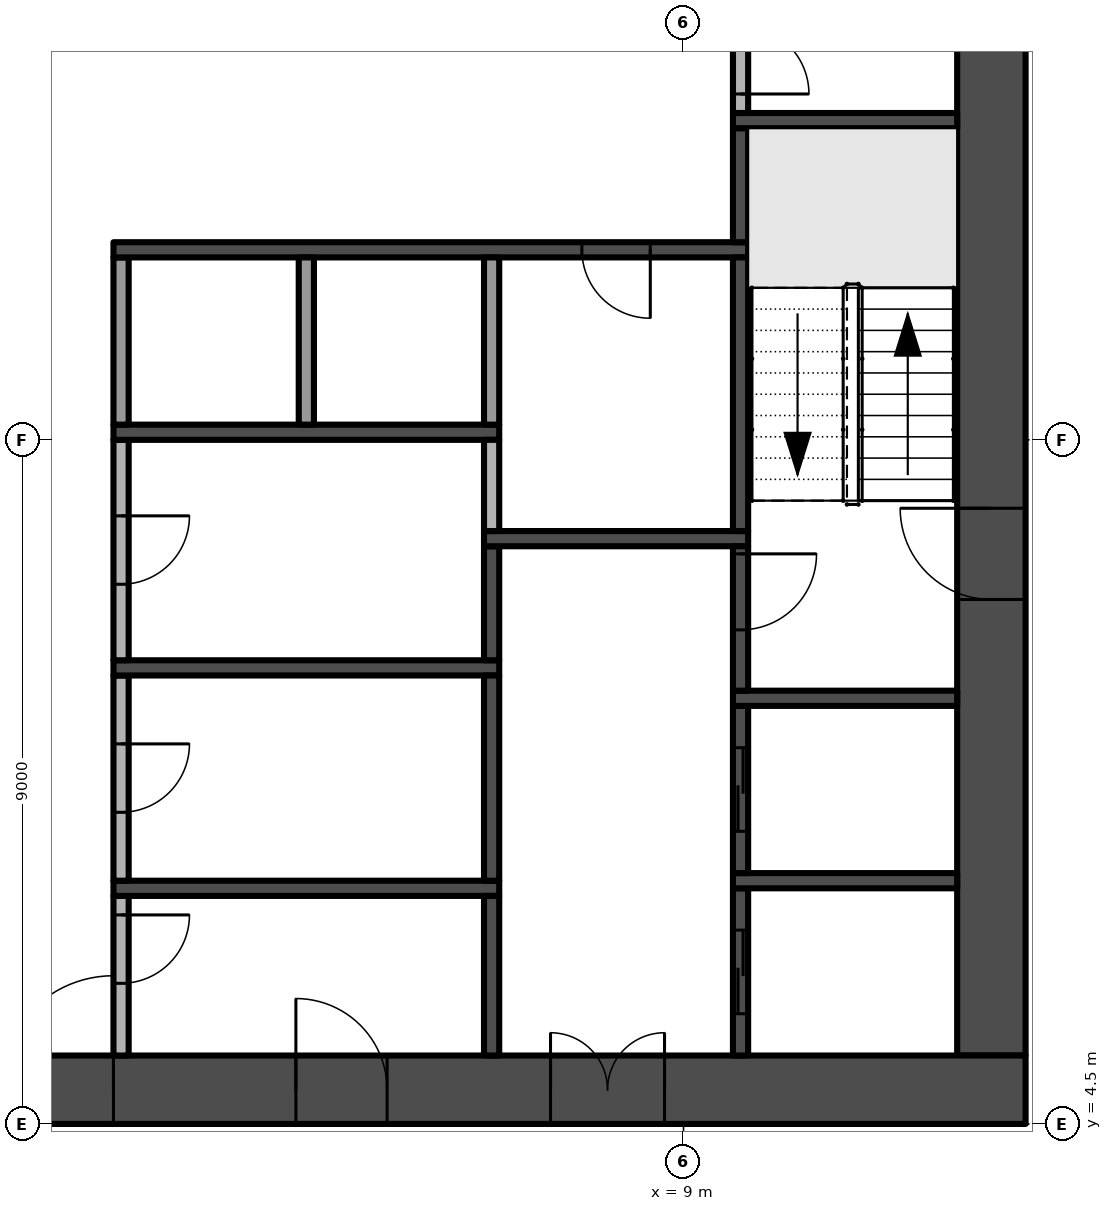
"""IFC4 building model, lengths in metres.
Left out: names, types, materials, properties, quantities, classifications, styles, units other than length and angle.
Written with IfcOpenShell. Run it as: python <this file> out.ifc"""

import sys

from ifc_helpers import new_model, si_unit, direction, frame, frame_2d, origin, place, context, subcontext, project, spatial, rectangle, extrude, element, fill, save


model = new_model("IFC4")
c1 = context("Model", 3, precision=1e-05, world=origin(), true_north=direction((0.0, 1.0)))
c2 = subcontext(c1, "Body", "Model", "MODEL_VIEW")
j1 = project(units=[si_unit("LENGTHUNIT", "METRE"), si_unit("PLANEANGLEUNIT", "RADIAN")], contexts=[c1])
p1 = place(None, origin())
s1 = spatial("IfcSite", under=j1, at=p1, CompositionType="ELEMENT")
p2 = place(p1, origin())
s2 = spatial("IfcBuilding", under=s1, at=p2, CompositionType="ELEMENT")
p3 = place(p2, frame((0.0, 0.0, 49.2)))
s3 = spatial("IfcBuildingStorey", under=s2, at=p3, CompositionType="ELEMENT", Elevation=49.2)
p4 = place(p3, frame((-13.5, 4.95, -0.3), z_axis=(0.0, 0.0, 1.0), x_axis=(1.0, 0.0, 0.0)))
e1 = element("IfcWall", 1, at=p4, inside=s3, PredefinedType="SHEAR", context=c2, shape_type="SweptSolid", body=[
    extrude(rectangle(XDim=27.0, YDim=0.9, at=frame_2d((13.5, 0.0))), origin(), (0.0, 0.0, 1.0), 3.8),
])
p5 = place(p4, frame((12.0, 0.0, 0.3)))
e2 = element("IfcOpeningElement", 2, at=p5, cuts=e1, PredefinedType="OPENING", context=c2, shape_type="SweptSolid", body=[
    extrude(rectangle(XDim=3.0, YDim=2.4, at=frame_2d((1.5, 1.2))), frame((0.0, 0.46, 0.0), z_axis=(0.0, -1.0, 0.0), x_axis=(1.0, 0.0, 0.0)), (0.0, 0.0, 1.0), 0.92),
])
p6 = place(p4, frame((4.9, 0.0, 0.3)))
e3 = element("IfcOpeningElement", 3, at=p6, cuts=e1, PredefinedType="OPENING", context=c2, shape_type="SweptSolid", body=[
    extrude(rectangle(XDim=1.2, YDim=2.2, at=frame_2d((0.6, 1.1))), frame((0.0, 0.46, 0.0), z_axis=(0.0, -1.0, 0.0), x_axis=(1.0, 0.0, 0.0)), (0.0, 0.0, 1.0), 0.92),
])
p7 = place(p4, frame((20.75, 0.0, 0.3)))
e4 = element("IfcOpeningElement", 4, at=p7, cuts=e1, PredefinedType="OPENING", context=c2, shape_type="SweptSolid", body=[
    extrude(rectangle(XDim=1.5, YDim=2.2, at=frame_2d((0.75, 1.1))), frame((0.0, 0.46, 0.0), z_axis=(0.0, -1.0, 0.0), x_axis=(1.0, 0.0, 0.0)), (0.0, 0.0, 1.0), 0.92),
])
p8 = place(p4, frame((17.4, 0.0, 0.3)))
e5 = element("IfcOpeningElement", 5, at=p8, cuts=e1, PredefinedType="OPENING", context=c2, shape_type="SweptSolid", body=[
    extrude(rectangle(XDim=1.2, YDim=2.2, at=frame_2d((0.6, 1.1))), frame((0.0, 0.46, 0.0), z_axis=(0.0, -1.0, 0.0), x_axis=(1.0, 0.0, 0.0)), (0.0, 0.0, 1.0), 0.92),
])
p9 = place(p3, frame((13.05, 5.4, -0.3), z_axis=(0.0, 0.0, 1.0), x_axis=(0.0, 1.0, 0.0)))
e6 = element("IfcWall", 6, at=p9, inside=s3, PredefinedType="SHEAR", context=c2, shape_type="SweptSolid", body=[
    extrude(rectangle(XDim=16.2, YDim=0.9, at=frame_2d((8.1, 0.0))), origin(), (0.0, 0.0, 1.0), 3.8),
])
p10 = place(p9, frame((6.0, 0.0, 0.3)))
e7 = element("IfcOpeningElement", 7, at=p10, cuts=e6, PredefinedType="OPENING", context=c2, shape_type="SweptSolid", body=[
    extrude(rectangle(XDim=1.2, YDim=2.2, at=frame_2d((0.6, 1.1))), frame((0.0, 0.46, 0.0), z_axis=(0.0, -1.0, 0.0), x_axis=(1.0, 0.0, 0.0)), (0.0, 0.0, 1.0), 0.92),
])
p11 = place(p3, frame((1.6, 7.5, 0.0), z_axis=(0.0, 0.0, 1.0), x_axis=(0.0, -1.0, 0.0)))
e8 = element("IfcWall", 8, at=p11, inside=s3, PredefinedType="PARTITIONING", context=c2, shape_type="SweptSolid", body=[
    extrude(rectangle(XDim=2.1, YDim=0.2, at=frame_2d((1.05, 0.0))), origin(), (0.0, 0.0, 1.0), 3.5),
])
p12 = place(p11, frame((0.25, 0.0, 0.0)))
e9 = element("IfcOpeningElement", 9, at=p12, cuts=e8, PredefinedType="OPENING", context=c2, shape_type="SweptSolid", body=[
    extrude(rectangle(XDim=0.9, YDim=2.1, at=frame_2d((0.45, 1.05))), frame((0.0, 0.11, 0.0), z_axis=(0.0, -1.0, 0.0), x_axis=(1.0, 0.0, 0.0)), (0.0, 0.0, 1.0), 0.22),
])
p13 = place(p3, frame((1.5, 7.6, 0.0), z_axis=(0.0, 0.0, 1.0), x_axis=(1.0, 0.0, 0.0)))
e10 = element("IfcWall", 10, at=p13, inside=s3, PredefinedType="SHEAR", context=c2, shape_type="SweptSolid", body=[
    extrude(rectangle(XDim=5.075, YDim=0.2, at=frame_2d((2.538, 0.0))), origin(), (0.0, 0.0, 1.0), 3.5),
])
p14 = place(p3, frame((1.6, 10.4, 0.0), z_axis=(0.0, 0.0, 1.0), x_axis=(0.0, -1.0, 0.0)))
e11 = element("IfcWall", 11, at=p14, inside=s3, PredefinedType="PARTITIONING", context=c2, shape_type="SweptSolid", body=[
    extrude(rectangle(XDim=2.7, YDim=0.2, at=frame_2d((1.35, 0.0))), origin(), (0.0, 0.0, 1.0), 3.5),
])
p15 = place(p14, frame((0.9, 0.0, 0.0)))
e12 = element("IfcOpeningElement", 12, at=p15, cuts=e11, PredefinedType="OPENING", context=c2, shape_type="SweptSolid", body=[
    extrude(rectangle(XDim=0.9, YDim=2.1, at=frame_2d((0.45, 1.05))), frame((0.0, 0.11, 0.0), z_axis=(0.0, -1.0, 0.0), x_axis=(1.0, 0.0, 0.0)), (0.0, 0.0, 1.0), 0.22),
])
p16 = place(p3, frame((1.5, 10.5, 0.0), z_axis=(0.0, 0.0, 1.0), x_axis=(1.0, 0.0, 0.0)))
e13 = element("IfcWall", 13, at=p16, inside=s3, PredefinedType="SHEAR", context=c2, shape_type="SweptSolid", body=[
    extrude(rectangle(XDim=5.075, YDim=0.2, at=frame_2d((2.538, 0.0))), origin(), (0.0, 0.0, 1.0), 3.5),
])
p17 = place(p3, frame((1.6, 13.5, 0.0), z_axis=(0.0, 0.0, 1.0), x_axis=(0.0, -1.0, 0.0)))
e14 = element("IfcWall", 14, at=p17, inside=s3, PredefinedType="PARTITIONING", context=c2, shape_type="SweptSolid", body=[
    extrude(rectangle(XDim=2.9, YDim=0.2, at=frame_2d((1.45, 0.0))), origin(), (0.0, 0.0, 1.0), 3.5),
])
p18 = place(p17, frame((1.0, 0.0, 0.0)))
e15 = element("IfcOpeningElement", 15, at=p18, cuts=e14, PredefinedType="OPENING", context=c2, shape_type="SweptSolid", body=[
    extrude(rectangle(XDim=0.9, YDim=2.1, at=frame_2d((0.45, 1.05))), frame((0.0, 0.11, 0.0), z_axis=(0.0, -1.0, 0.0), x_axis=(1.0, 0.0, 0.0)), (0.0, 0.0, 1.0), 0.22),
])
p19 = place(p3, frame((1.5, 13.6, 0.0), z_axis=(0.0, 0.0, 1.0), x_axis=(1.0, 0.0, 0.0)))
e16 = element("IfcWall", 16, at=p19, inside=s3, PredefinedType="SHEAR", context=c2, shape_type="SweptSolid", body=[
    extrude(rectangle(XDim=5.075, YDim=0.2, at=frame_2d((2.538, 0.0))), origin(), (0.0, 0.0, 1.0), 3.5),
])
p20 = place(p3, frame((1.6, 13.7, 0.0), z_axis=(0.0, 0.0, 1.0), x_axis=(0.0, 1.0, 0.0)))
e17 = element("IfcWall", 17, at=p20, inside=s3, PredefinedType="PARTITIONING", context=c2, shape_type="SweptSolid", body=[
    extrude(rectangle(XDim=2.2, YDim=0.2, at=frame_2d((1.1, 0.0))), origin(), (0.0, 0.0, 1.0), 3.5),
])
p21 = place(p3, frame((9.85, 16.0, 0.0), z_axis=(0.0, 0.0, 1.0), x_axis=(-1.0, 0.0, 0.0)))
e18 = element("IfcWall", 18, at=p21, inside=s3, PredefinedType="SHEAR", context=c2, shape_type="SweptSolid", body=[
    extrude(rectangle(XDim=8.35, YDim=0.2, at=frame_2d((4.175, 0.0))), origin(), (0.0, 0.0, 1.0), 3.5),
])
p22 = place(p21, frame((1.288, 0.0, 0.0)))
e19 = element("IfcOpeningElement", 19, at=p22, cuts=e18, PredefinedType="OPENING", context=c2, shape_type="SweptSolid", body=[
    extrude(rectangle(XDim=0.9, YDim=2.1, at=frame_2d((0.45, 1.05))), frame((0.0, 0.11, 0.0), z_axis=(0.0, -1.0, 0.0), x_axis=(1.0, 0.0, 0.0)), (0.0, 0.0, 1.0), 0.22),
])
p23 = place(p3, frame((4.037, 13.7, 0.0), z_axis=(0.0, 0.0, 1.0), x_axis=(0.0, 1.0, 0.0)))
e20 = element("IfcWall", 20, at=p23, inside=s3, PredefinedType="PARTITIONING", context=c2, shape_type="SweptSolid", body=[
    extrude(rectangle(XDim=2.2, YDim=0.2, at=frame_2d((1.1, 0.0))), origin(), (0.0, 0.0, 1.0), 3.5),
])
p24 = place(p3, frame((6.475, 5.4, 0.0), z_axis=(0.0, 0.0, 1.0), x_axis=(0.0, 1.0, 0.0)))
e21 = element("IfcWall", 21, at=p24, inside=s3, PredefinedType="SHEAR", context=c2, shape_type="SweptSolid", body=[
    extrude(rectangle(XDim=2.1, YDim=0.2, at=frame_2d((1.05, 0.0))), origin(), (0.0, 0.0, 1.0), 3.5),
])
p25 = place(p3, frame((6.475, 7.7, 0.0), z_axis=(0.0, 0.0, 1.0), x_axis=(0.0, 1.0, 0.0)))
e22 = element("IfcWall", 22, at=p25, inside=s3, PredefinedType="SHEAR", context=c2, shape_type="SweptSolid", body=[
    extrude(rectangle(XDim=2.7, YDim=0.2, at=frame_2d((1.35, 0.0))), origin(), (0.0, 0.0, 1.0), 3.5),
])
p26 = place(p3, frame((6.475, 10.6, 0.0), z_axis=(0.0, 0.0, 1.0), x_axis=(0.0, 1.0, 0.0)))
e23 = element("IfcWall", 23, at=p26, inside=s3, PredefinedType="SHEAR", context=c2, shape_type="SweptSolid", body=[
    extrude(rectangle(XDim=1.5, YDim=0.2, at=frame_2d((0.75, 0.0))), origin(), (0.0, 0.0, 1.0), 3.5),
])
p27 = place(p3, frame((6.375, 12.2, 0.0), z_axis=(0.0, 0.0, 1.0), x_axis=(1.0, 0.0, 0.0)))
e24 = element("IfcWall", 24, at=p27, inside=s3, PredefinedType="SHEAR", context=c2, shape_type="SweptSolid", body=[
    extrude(rectangle(XDim=3.475, YDim=0.2, at=frame_2d((1.738, 0.0))), origin(), (0.0, 0.0, 1.0), 3.5),
])
p28 = place(p3, frame((6.475, 12.3, 0.0), z_axis=(0.0, 0.0, 1.0), x_axis=(0.0, 1.0, 0.0)))
e25 = element("IfcWall", 25, at=p28, inside=s3, PredefinedType="PARTITIONING", context=c2, shape_type="SweptSolid", body=[
    extrude(rectangle(XDim=1.2, YDim=0.2, at=frame_2d((0.6, 0.0))), origin(), (0.0, 0.0, 1.0), 3.5),
])
p29 = place(p3, frame((6.475, 13.7, 0.0), z_axis=(0.0, 0.0, 1.0), x_axis=(0.0, 1.0, 0.0)))
e26 = element("IfcWall", 26, at=p29, inside=s3, PredefinedType="PARTITIONING", context=c2, shape_type="SweptSolid", body=[
    extrude(rectangle(XDim=2.2, YDim=0.2, at=frame_2d((1.1, 0.0))), origin(), (0.0, 0.0, 1.0), 3.5),
])
p30 = place(p3, frame((9.75, 5.4, 0.0), z_axis=(0.0, 0.0, 1.0), x_axis=(0.0, 1.0, 0.0)))
e27 = element("IfcWall", 27, at=p30, inside=s3, PredefinedType="SHEAR", context=c2, shape_type="SweptSolid", body=[
    extrude(rectangle(XDim=2.2, YDim=0.2, at=frame_2d((1.1, 0.0))), origin(), (0.0, 0.0, 1.0), 3.5),
])
p31 = place(p30, frame((0.55, 0.0, 0.0)))
e28 = element("IfcOpeningElement", 28, at=p31, cuts=e27, PredefinedType="OPENING", context=c2, shape_type="SweptSolid", body=[
    extrude(rectangle(XDim=1.1, YDim=2.1, at=frame_2d((0.55, 1.05))), frame((0.0, 0.11, 0.0), z_axis=(0.0, -1.0, 0.0), x_axis=(1.0, 0.0, 0.0)), (0.0, 0.0, 1.0), 0.22),
])
p32 = place(p3, frame((9.65, 7.7, 0.0), z_axis=(0.0, 0.0, 1.0), x_axis=(1.0, 0.0, 0.0)))
e29 = element("IfcWall", 29, at=p32, inside=s3, PredefinedType="SHEAR", context=c2, shape_type="SweptSolid", body=[
    extrude(rectangle(XDim=2.95, YDim=0.2, at=frame_2d((1.475, 0.0))), origin(), (0.0, 0.0, 1.0), 3.5),
])
p33 = place(p3, frame((9.75, 7.8, 0.0), z_axis=(0.0, 0.0, 1.0), x_axis=(0.0, 1.0, 0.0)))
e30 = element("IfcWall", 30, at=p33, inside=s3, PredefinedType="SHEAR", context=c2, shape_type="SweptSolid", body=[
    extrude(rectangle(XDim=2.2, YDim=0.2, at=frame_2d((1.1, 0.0))), origin(), (0.0, 0.0, 1.0), 3.5),
])
p34 = place(p33, frame((0.55, 0.0, 0.0)))
e31 = element("IfcOpeningElement", 31, at=p34, cuts=e30, PredefinedType="OPENING", context=c2, shape_type="SweptSolid", body=[
    extrude(rectangle(XDim=1.1, YDim=2.1, at=frame_2d((0.55, 1.05))), frame((0.0, 0.11, 0.0), z_axis=(0.0, -1.0, 0.0), x_axis=(1.0, 0.0, 0.0)), (0.0, 0.0, 1.0), 0.22),
])
p35 = place(p3, frame((9.65, 10.1, 0.0), z_axis=(0.0, 0.0, 1.0), x_axis=(1.0, 0.0, 0.0)))
e32 = element("IfcWall", 32, at=p35, inside=s3, PredefinedType="SHEAR", context=c2, shape_type="SweptSolid", body=[
    extrude(rectangle(XDim=2.95, YDim=0.2, at=frame_2d((1.475, 0.0))), origin(), (0.0, 0.0, 1.0), 3.5),
])
p36 = place(p3, frame((9.75, 12.1, 0.0), z_axis=(0.0, 0.0, 1.0), x_axis=(0.0, -1.0, 0.0)))
e33 = element("IfcWall", 33, at=p36, inside=s3, PredefinedType="SHEAR", context=c2, shape_type="SweptSolid", body=[
    extrude(rectangle(XDim=1.9, YDim=0.2, at=frame_2d((0.95, 0.0))), origin(), (0.0, 0.0, 1.0), 3.5),
])
p37 = place(p36, frame((0.1, 0.0, 0.0)))
e34 = element("IfcOpeningElement", 34, at=p37, cuts=e33, PredefinedType="OPENING", context=c2, shape_type="SweptSolid", body=[
    extrude(rectangle(XDim=1.0, YDim=2.2, at=frame_2d((0.5, 1.1))), frame((0.0, 0.11, 0.0), z_axis=(0.0, -1.0, 0.0), x_axis=(1.0, 0.0, 0.0)), (0.0, 0.0, 1.0), 0.22),
])
p38 = place(p3, frame((9.75, 12.3, 0.0), z_axis=(0.0, 0.0, 1.0), x_axis=(0.0, 1.0, 0.0)))
e35 = element("IfcWall", 35, at=p38, inside=s3, PredefinedType="SHEAR", context=c2, shape_type="SweptSolid", body=[
    extrude(rectangle(XDim=3.6, YDim=0.2, at=frame_2d((1.8, 0.0))), origin(), (0.0, 0.0, 1.0), 3.5),
])
p39 = place(p3, frame((9.75, 16.1, 0.0), z_axis=(0.0, 0.0, 1.0), x_axis=(0.0, 1.0, 0.0)))
e36 = element("IfcWall", 36, at=p39, inside=s3, PredefinedType="SHEAR", context=c2, shape_type="SweptSolid", body=[
    extrude(rectangle(XDim=1.5, YDim=0.2, at=frame_2d((0.75, 0.0))), origin(), (0.0, 0.0, 1.0), 3.5),
])
p40 = place(p3, frame((9.65, 17.7, 0.0), z_axis=(0.0, 0.0, 1.0), x_axis=(1.0, 0.0, 0.0)))
e37 = element("IfcWall", 37, at=p40, inside=s3, PredefinedType="SHEAR", context=c2, shape_type="SweptSolid", body=[
    extrude(rectangle(XDim=2.95, YDim=0.2, at=frame_2d((1.475, 0.0))), origin(), (0.0, 0.0, 1.0), 3.5),
])
p41 = place(p3, frame((9.75, 19.2, 0.0), z_axis=(0.0, 0.0, 1.0), x_axis=(0.0, -1.0, 0.0)))
e38 = element("IfcWall", 38, at=p41, inside=s3, PredefinedType="PARTITIONING", context=c2, shape_type="SweptSolid", body=[
    extrude(rectangle(XDim=1.4, YDim=0.2, at=frame_2d((0.7, 0.0))), origin(), (0.0, 0.0, 1.0), 3.5),
])
p42 = place(p41, frame((0.25, 0.0, 0.0)))
e39 = element("IfcOpeningElement", 39, at=p42, cuts=e38, PredefinedType="OPENING", context=c2, shape_type="SweptSolid", body=[
    extrude(rectangle(XDim=0.9, YDim=2.1, at=frame_2d((0.45, 1.05))), frame((0.0, 0.11, 0.0), z_axis=(0.0, -1.0, 0.0), x_axis=(1.0, 0.0, 0.0)), (0.0, 0.0, 1.0), 0.22),
])
p43 = place(p5, frame((3.0, 0.0, 0.0), z_axis=(0.0, 0.0, 1.0), x_axis=(-1.0, 0.0, 0.0)))
e40 = element("IfcDoor", 40, at=p43, inside=s3, OperationType="DOUBLE_DOOR_SINGLE_SWING", PredefinedType="DOOR", context=c2, shape_type="SweptSolid", body=[
    extrude(rectangle(XDim=3.0, YDim=2.4, at=frame_2d((1.5, 1.2))), frame((0.0, 0.025, 0.0), z_axis=(0.0, -1.0, 0.0), x_axis=(1.0, 0.0, 0.0)), (0.0, 0.0, 1.0), 0.05),
])
fill(e2, e40)
p44 = place(p10, frame((1.2, 0.0, 0.0), z_axis=(0.0, 0.0, 1.0), x_axis=(-1.0, 0.0, 0.0)))
e41 = element("IfcDoor", 41, at=p44, inside=s3, OperationType="SINGLE_SWING_LEFT", PredefinedType="DOOR", context=c2, shape_type="SweptSolid", body=[
    extrude(rectangle(XDim=1.2, YDim=2.2, at=frame_2d((0.6, 1.1))), frame((0.0, 0.025, 0.0), z_axis=(0.0, -1.0, 0.0), x_axis=(1.0, 0.0, 0.0)), (0.0, 0.0, 1.0), 0.05),
])
fill(e7, e41)
p45 = place(p7, frame((1.5, 0.0, 0.0), z_axis=(0.0, 0.0, 1.0), x_axis=(-1.0, 0.0, 0.0)))
e42 = element("IfcDoor", 42, at=p45, inside=s3, OperationType="DOUBLE_DOOR_SINGLE_SWING", PredefinedType="DOOR", context=c2, shape_type="SweptSolid", body=[
    extrude(rectangle(XDim=1.5, YDim=2.2, at=frame_2d((0.75, 1.1))), frame((0.0, 0.025, 0.0), z_axis=(0.0, -1.0, 0.0), x_axis=(1.0, 0.0, 0.0)), (0.0, 0.0, 1.0), 0.05),
])
fill(e4, e42)
p46 = place(p8, frame((1.2, 0.0, 0.0), z_axis=(0.0, 0.0, 1.0), x_axis=(-1.0, 0.0, 0.0)))
e43 = element("IfcDoor", 43, at=p46, inside=s3, OperationType="SINGLE_SWING_RIGHT", PredefinedType="DOOR", context=c2, shape_type="SweptSolid", body=[
    extrude(rectangle(XDim=1.2, YDim=2.2, at=frame_2d((0.6, 1.1))), frame((0.0, 0.025, 0.0), z_axis=(0.0, -1.0, 0.0), x_axis=(1.0, 0.0, 0.0)), (0.0, 0.0, 1.0), 0.05),
])
fill(e5, e43)
p47 = place(p37, origin())
e44 = element("IfcDoor", 44, at=p47, inside=s3, OperationType="SINGLE_SWING_LEFT", PredefinedType="DOOR", context=c2, shape_type="SweptSolid", body=[
    extrude(rectangle(XDim=1.0, YDim=2.2, at=frame_2d((0.5, 1.1))), frame((0.0, 0.025, 0.0), z_axis=(0.0, -1.0, 0.0), x_axis=(1.0, 0.0, 0.0)), (0.0, 0.0, 1.0), 0.05),
])
fill(e34, e44)
p48 = place(p31, origin())
e45 = element("IfcDoor", 45, at=p48, inside=s3, OperationType="SLIDING_TO_RIGHT", PredefinedType="DOOR", context=c2, shape_type="SweptSolid", body=[
    extrude(rectangle(XDim=1.1, YDim=2.1, at=frame_2d((0.55, 1.05))), frame((0.0, 0.025, 0.0), z_axis=(0.0, -1.0, 0.0), x_axis=(1.0, 0.0, 0.0)), (0.0, 0.0, 1.0), 0.05),
])
fill(e28, e45)
p49 = place(p34, origin())
e46 = element("IfcDoor", 46, at=p49, inside=s3, OperationType="SLIDING_TO_RIGHT", PredefinedType="DOOR", context=c2, shape_type="SweptSolid", body=[
    extrude(rectangle(XDim=1.1, YDim=2.1, at=frame_2d((0.55, 1.05))), frame((0.0, 0.025, 0.0), z_axis=(0.0, -1.0, 0.0), x_axis=(1.0, 0.0, 0.0)), (0.0, 0.0, 1.0), 0.05),
])
fill(e31, e46)
p50 = place(p12, origin())
e47 = element("IfcDoor", 47, at=p50, inside=s3, OperationType="SINGLE_SWING_LEFT", PredefinedType="DOOR", context=c2, shape_type="SweptSolid", body=[
    extrude(rectangle(XDim=0.9, YDim=2.1, at=frame_2d((0.45, 1.05))), frame((0.0, 0.025, 0.0), z_axis=(0.0, -1.0, 0.0), x_axis=(1.0, 0.0, 0.0)), (0.0, 0.0, 1.0), 0.05),
])
fill(e9, e47)
p51 = place(p15, origin())
e48 = element("IfcDoor", 48, at=p51, inside=s3, OperationType="SINGLE_SWING_LEFT", PredefinedType="DOOR", context=c2, shape_type="SweptSolid", body=[
    extrude(rectangle(XDim=0.9, YDim=2.1, at=frame_2d((0.45, 1.05))), frame((0.0, 0.025, 0.0), z_axis=(0.0, -1.0, 0.0), x_axis=(1.0, 0.0, 0.0)), (0.0, 0.0, 1.0), 0.05),
])
fill(e12, e48)
p52 = place(p18, origin())
e49 = element("IfcDoor", 49, at=p52, inside=s3, OperationType="SINGLE_SWING_LEFT", PredefinedType="DOOR", context=c2, shape_type="SweptSolid", body=[
    extrude(rectangle(XDim=0.9, YDim=2.1, at=frame_2d((0.45, 1.05))), frame((0.0, 0.025, 0.0), z_axis=(0.0, -1.0, 0.0), x_axis=(1.0, 0.0, 0.0)), (0.0, 0.0, 1.0), 0.05),
])
fill(e15, e49)
p53 = place(p22, origin())
e50 = element("IfcDoor", 50, at=p53, inside=s3, OperationType="SINGLE_SWING_LEFT", PredefinedType="DOOR", context=c2, shape_type="SweptSolid", body=[
    extrude(rectangle(XDim=0.9, YDim=2.1, at=frame_2d((0.45, 1.05))), frame((0.0, 0.025, 0.0), z_axis=(0.0, -1.0, 0.0), x_axis=(1.0, 0.0, 0.0)), (0.0, 0.0, 1.0), 0.05),
])
fill(e19, e50)
p54 = place(p42, origin())
e51 = element("IfcDoor", 51, at=p54, inside=s3, OperationType="SINGLE_SWING_RIGHT", PredefinedType="DOOR", context=c2, shape_type="SweptSolid", body=[
    extrude(rectangle(XDim=0.9, YDim=2.1, at=frame_2d((0.45, 1.05))), frame((0.0, 0.025, 0.0), z_axis=(0.0, -1.0, 0.0), x_axis=(1.0, 0.0, 0.0)), (0.0, 0.0, 1.0), 0.05),
])
fill(e39, e51)
save(model, sys.argv[1])
